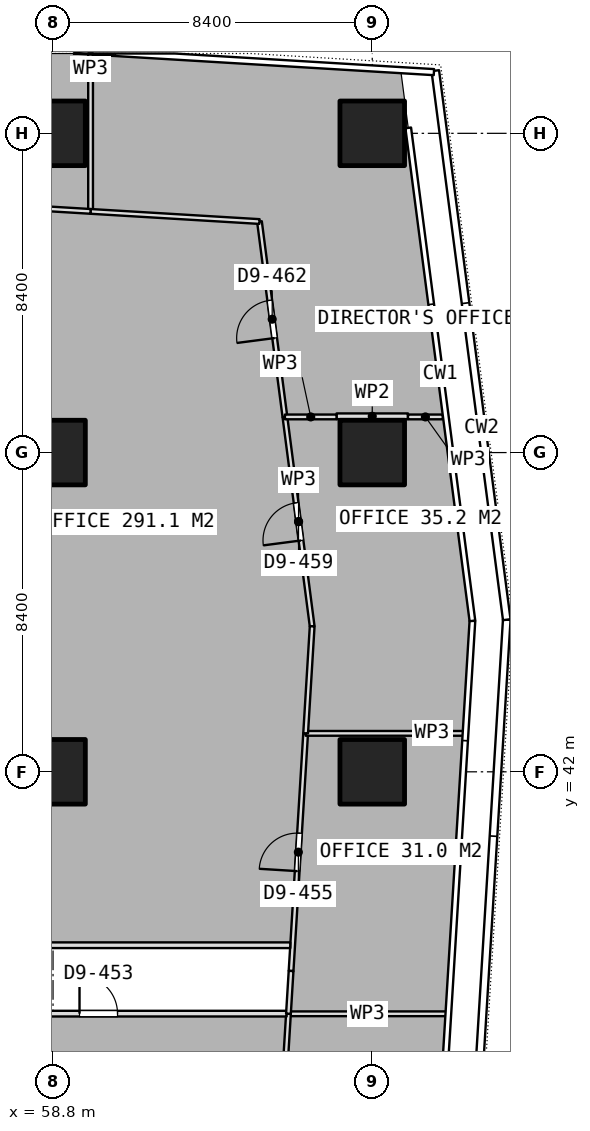
"""IFC4 building model, lengths in metres.
Left out: names, types, materials, properties, quantities, classifications, styles, units other than length and angle.
Written with IfcOpenShell. Run it as: python <this file> out.ifc"""

import sys

from ifc_helpers import new_model, si_unit, direction, frame, frame_2d, origin, origin_2d, place, context, subcontext, project, spatial, rectangle, extrude, element, fill, save


model = new_model("IFC4")
c1 = context("Model", 3, precision=1e-05, world=origin(), true_north=direction((0.0, 1.0)))
c2 = subcontext(c1, "Body", "Model", "MODEL_VIEW")
j1 = project(units=[si_unit("LENGTHUNIT", "METRE"), si_unit("PLANEANGLEUNIT", "RADIAN")], contexts=[c1])
p1 = place(None, origin())
s1 = spatial("IfcSite", under=j1, at=p1, CompositionType="ELEMENT")
p2 = place(p1, origin())
s2 = spatial("IfcBuilding", under=s1, at=p2, CompositionType="ELEMENT")
p3 = place(p2, frame((0.0, 0.0, 121.55)))
s3 = spatial("IfcBuildingStorey", under=s2, at=p3, CompositionType="ELEMENT", Elevation=121.55)
for number, where, z_axis, x_axis in (
    (1, (58.8, 42.0, 0.0), (0.0, 0.0, 1.0), (1.0, 0.0, 0.0)),
    (2, (58.8, 50.4, 0.0), (0.0, 0.0, 1.0), (1.0, 0.0, 0.0)),
    (3, (58.8, 58.8, 0.0), (0.0, 0.0, 1.0), (1.0, 0.0, 0.0)),
    (4, (67.2, 42.0, 0.0), (0.0, 0.0, 1.0), (1.0, 0.0, 0.0)),
    (5, (67.2, 50.4, 0.0), (0.0, 0.0, 1.0), (1.0, 0.0, 0.0)),
    (6, (67.2, 58.8, 0.0), (0.0, 0.0, 1.0), (1.0, 0.0, 0.0)),
):
    element("IfcColumn", number, at=place(p3, frame(where, z_axis=z_axis, x_axis=x_axis)), inside=s3, PredefinedType="COLUMN", context=c2, shape_type="SweptSolid", body=[
        extrude(rectangle(XDim=1.7, YDim=1.7, at=origin_2d()), origin(), (0.0, 0.0, 1.0), 3.75),
    ])
p4 = place(p3, frame((64.995, 35.633, 0.0), z_axis=(0.0, 0.0, 1.0), x_axis=(1.0, 0.0, 0.0)))
e7 = element("IfcWall", 7, at=p4, inside=s3, PredefinedType="PARTITIONING", context=c2, shape_type="SweptSolid", body=[
    extrude(rectangle(XDim=4.157, YDim=0.125, at=frame_2d((2.079, 0.0))), origin(), (0.0, 0.0, 1.0), 3.5),
])
p5 = place(p3, frame((64.527, 28.001, 0.0), z_axis=(0.0, 0.0, 1.0), x_axis=(0.061207439092, 0.998125067013, 0.0)))
e8 = element("IfcWall", 8, at=p5, inside=s3, PredefinedType="PARTITIONING", context=c2, shape_type="SweptSolid", body=[
    extrude(rectangle(XDim=7.646, YDim=0.125, at=frame_2d((3.823, 0.0))), origin(), (0.0, 0.0, 1.0), 3.5),
])
p6 = place(p5, frame((3.323, 0.0, 0.0)))
e9 = element("IfcOpeningElement", 9, at=p6, cuts=e8, PredefinedType="OPENING", context=c2, shape_type="SweptSolid", body=[
    extrude(rectangle(XDim=1.0, YDim=2.1, at=frame_2d((0.5, 1.05))), frame((0.0, 0.073, 0.0), z_axis=(0.0, -1.0, 0.0), x_axis=(1.0, 0.0, 0.0)), (0.0, 0.0, 1.0), 0.145),
])
p7 = place(p3, frame((65.064, 36.76, 0.0), z_axis=(0.0, 0.0, 1.0), x_axis=(0.061155234725, 0.998128266941, 0.0)))
e10 = element("IfcWall", 10, at=p7, inside=s3, PredefinedType="PARTITIONING", context=c2, shape_type="SweptSolid", body=[
    extrude(rectangle(XDim=6.264, YDim=0.125, at=frame_2d((3.132, 0.0))), origin(), (0.0, 0.0, 1.0), 3.5),
])
p8 = place(p7, frame((2.632, 0.0, 0.0)))
e11 = element("IfcOpeningElement", 11, at=p8, cuts=e10, PredefinedType="OPENING", context=c2, shape_type="SweptSolid", body=[
    extrude(rectangle(XDim=1.0, YDim=2.1, at=frame_2d((0.5, 1.05))), frame((0.0, 0.073, 0.0), z_axis=(0.0, -1.0, 0.0), x_axis=(1.0, 0.0, 0.0)), (0.0, 0.0, 1.0), 0.145),
])
p9 = place(p3, frame((65.447, 43.012, 0.0), z_axis=(0.0, 0.0, 1.0), x_axis=(1.0, 0.0, 0.0)))
e12 = element("IfcWall", 12, at=p9, inside=s3, PredefinedType="PARTITIONING", context=c2, shape_type="SweptSolid", body=[
    extrude(rectangle(XDim=4.157, YDim=0.125, at=frame_2d((2.079, 0.0))), origin(), (0.0, 0.0, 1.0), 3.5),
])
p10 = place(p3, frame((64.995, 35.634, 0.0), z_axis=(0.0, 0.0, 1.0), x_axis=(0.061030858212, 0.998135879701, 0.0)))
e13 = element("IfcWall", 13, at=p10, inside=s3, PredefinedType="PARTITIONING", context=c2, shape_type="SweptSolid", body=[
    extrude(rectangle(XDim=1.128, YDim=0.125, at=frame_2d((0.564, 0.0))), origin(), (0.0, 0.0, 1.0), 3.5),
])
p11 = place(p3, frame((64.902, 51.338, 0.0), z_axis=(0.0, 0.0, 1.0), x_axis=(1.0, 0.0, 0.0)))
e14 = element("IfcWall", 14, at=p11, inside=s3, PredefinedType="PARTITIONING", context=c2, shape_type="SweptSolid", body=[
    extrude(rectangle(XDim=1.358, YDim=0.125, at=frame_2d((0.679, 0.0))), origin(), (0.0, 0.0, 1.0), 3.5),
])
p12 = place(p3, frame((68.14, 51.338, 0.0), z_axis=(0.0, 0.0, 1.0), x_axis=(1.0, 0.0, 0.0)))
e15 = element("IfcWall", 15, at=p12, inside=s3, PredefinedType="PARTITIONING", context=c2, shape_type="SweptSolid", body=[
    extrude(rectangle(XDim=0.917, YDim=0.125, at=frame_2d((0.458, 0.0))), origin(), (0.0, 0.0, 1.0), 3.5),
])
p13 = place(p3, frame((65.447, 43.013, 0.0), z_axis=(0.0, 0.0, 1.0), x_axis=(0.060944611384, 0.998141149509, 0.0)))
e16 = element("IfcWall", 16, at=p13, inside=s3, PredefinedType="PARTITIONING", context=c2, shape_type="SweptSolid", body=[
    extrude(rectangle(XDim=2.82, YDim=0.125, at=frame_2d((1.41, 0.0))), origin(), (0.0, 0.0, 1.0), 3.5),
])
p14 = place(p3, frame((65.619, 45.828, 0.0), z_axis=(0.0, 0.0, 1.0), x_axis=(-0.129002942223, 0.991644210843, 0.0)))
e17 = element("IfcWall", 17, at=p14, inside=s3, PredefinedType="PARTITIONING", context=c2, shape_type="SweptSolid", body=[
    extrude(rectangle(XDim=5.556, YDim=0.125, at=frame_2d((2.778, 0.0))), origin(), (0.0, 0.0, 1.0), 3.5),
])
p15 = place(p14, frame((2.278, 0.0, 0.0)))
e18 = element("IfcOpeningElement", 18, at=p15, cuts=e17, PredefinedType="OPENING", context=c2, shape_type="SweptSolid", body=[
    extrude(rectangle(XDim=1.0, YDim=2.1, at=frame_2d((0.5, 1.05))), frame((0.0, 0.073, 0.0), z_axis=(0.0, -1.0, 0.0), x_axis=(1.0, 0.0, 0.0)), (0.0, 0.0, 1.0), 0.145),
])
p16 = place(p3, frame((59.788, 56.746, 0.0), z_axis=(0.0, 0.0, 1.0), x_axis=(0.0, 1.0, 0.0)))
e19 = element("IfcWall", 19, at=p16, inside=s3, PredefinedType="PARTITIONING", context=c2, shape_type="SweptSolid", body=[
    extrude(rectangle(XDim=4.157, YDim=0.125, at=frame_2d((2.079, 0.0))), origin(), (0.0, 0.0, 1.0), 3.5),
])
p17 = place(p3, frame((64.902, 51.339, 0.0), z_axis=(0.0, 0.0, 1.0), x_axis=(-0.129290857756, 0.991606713421, 0.0)))
e20 = element("IfcWall", 20, at=p17, inside=s3, PredefinedType="PARTITIONING", context=c2, shape_type="SweptSolid", body=[
    extrude(rectangle(XDim=5.183, YDim=0.125, at=frame_2d((2.592, 0.0))), origin(), (0.0, 0.0, 1.0), 3.5),
])
p18 = place(p17, frame((2.092, 0.0, 0.0)))
e21 = element("IfcOpeningElement", 21, at=p18, cuts=e20, PredefinedType="OPENING", context=c2, shape_type="SweptSolid", body=[
    extrude(rectangle(XDim=1.0, YDim=2.1, at=frame_2d((0.5, 1.05))), frame((0.0, 0.073, 0.0), z_axis=(0.0, -1.0, 0.0), x_axis=(1.0, 0.0, 0.0)), (0.0, 0.0, 1.0), 0.145),
])
p19 = place(p3, frame((64.232, 56.479, 0.0), z_axis=(0.0, 0.0, 1.0), x_axis=(-0.998198676411, 0.059995019888, 0.0)))
e22 = element("IfcWall", 22, at=p19, inside=s3, PredefinedType="PARTITIONING", context=c2, shape_type="SweptSolid", body=[
    extrude(rectangle(XDim=4.452, YDim=0.125, at=frame_2d((2.226, 0.0))), origin(), (0.0, 0.0, 1.0), 3.5),
])
p20 = place(p3, frame((59.787, 56.746, 0.0), z_axis=(0.0, 0.0, 1.0), x_axis=(-0.99820280668, 0.05992626083, 0.0)))
e23 = element("IfcWall", 23, at=p20, inside=s3, PredefinedType="PARTITIONING", context=c2, shape_type="SweptSolid", body=[
    extrude(rectangle(XDim=8.307, YDim=0.125, at=frame_2d((4.153, 0.0))), origin(), (0.0, 0.0, 1.0), 3.5),
])
p21 = place(p20, frame((3.653, 0.0, 0.0)))
e24 = element("IfcOpeningElement", 24, at=p21, cuts=e23, PredefinedType="OPENING", context=c2, shape_type="SweptSolid", body=[
    extrude(rectangle(XDim=1.0, YDim=2.1, at=frame_2d((0.5, 1.05))), frame((0.0, 0.073, 0.0), z_axis=(0.0, -1.0, 0.0), x_axis=(1.0, 0.0, 0.0)), (0.0, 0.0, 1.0), 0.145),
])
p22 = place(p3, frame((66.26, 51.355, 0.0), z_axis=(0.0, 0.0, 1.0), x_axis=(1.0, 0.0, 0.0)))
e25 = element("IfcWall", 25, at=p22, inside=s3, PredefinedType="PARTITIONING", context=c2, shape_type="SweptSolid", body=[
    extrude(rectangle(XDim=1.88, YDim=0.15, at=frame_2d((0.94, 0.0))), origin(), (0.0, 0.0, 1.0), 3.5),
])
p23 = place(p3, frame((65.043, 37.437, 0.0), z_axis=(0.0, 0.0, 1.0), x_axis=(-1.0, 0.0, 0.0)))
e26 = element("IfcWall", 26, at=p23, inside=s3, PredefinedType="PARTITIONING", context=c2, shape_type="SweptSolid", body=[
    extrude(rectangle(XDim=11.843, YDim=0.15, at=frame_2d((5.921, 0.0))), origin(), (0.0, 0.0, 1.0), 3.5),
])
p24 = place(p3, frame((53.2, 35.637, 0.0), z_axis=(0.0, 0.0, 1.0), x_axis=(1.0, 0.0, 0.0)))
e27 = element("IfcWall", 27, at=p24, inside=s3, PredefinedType="PARTITIONING", context=c2, shape_type="SweptSolid", body=[
    extrude(rectangle(XDim=11.746, YDim=0.15, at=frame_2d((5.873, 0.0))), origin(), (0.0, 0.0, 1.0), 3.5),
])
p25 = place(p24, frame((6.297, 0.0, 0.0)))
e28 = element("IfcOpeningElement", 28, at=p25, cuts=e27, PredefinedType="OPENING", context=c2, shape_type="SweptSolid", body=[
    extrude(rectangle(XDim=1.0, YDim=2.1, at=frame_2d((0.5, 1.05))), frame((0.0, 0.085, 0.0), z_axis=(0.0, -1.0, 0.0), x_axis=(1.0, 0.0, 0.0)), (0.0, 0.0, 1.0), 0.17),
])
p26 = place(p8, origin())
e29 = element("IfcDoor", 29, at=p26, inside=s3, OperationType="SINGLE_SWING_LEFT", PredefinedType="DOOR", context=c2, shape_type="SweptSolid", body=[
    extrude(rectangle(XDim=1.0, YDim=2.1, at=frame_2d((0.5, 1.05))), frame((0.0, 0.025, 0.0), z_axis=(0.0, -1.0, 0.0), x_axis=(1.0, 0.0, 0.0)), (0.0, 0.0, 1.0), 0.05),
])
fill(e11, e29)
p27 = place(p15, origin())
e30 = element("IfcDoor", 30, at=p27, inside=s3, OperationType="SINGLE_SWING_LEFT", PredefinedType="DOOR", context=c2, shape_type="SweptSolid", body=[
    extrude(rectangle(XDim=1.0, YDim=2.1, at=frame_2d((0.5, 1.05))), frame((0.0, 0.025, 0.0), z_axis=(0.0, -1.0, 0.0), x_axis=(1.0, 0.0, 0.0)), (0.0, 0.0, 1.0), 0.05),
])
fill(e18, e30)
p28 = place(p18, origin())
e31 = element("IfcDoor", 31, at=p28, inside=s3, OperationType="SINGLE_SWING_LEFT", PredefinedType="DOOR", context=c2, shape_type="SweptSolid", body=[
    extrude(rectangle(XDim=1.0, YDim=2.1, at=frame_2d((0.5, 1.05))), frame((0.0, 0.025, 0.0), z_axis=(0.0, -1.0, 0.0), x_axis=(1.0, 0.0, 0.0)), (0.0, 0.0, 1.0), 0.05),
])
fill(e21, e31)
p29 = place(p25, origin())
e32 = element("IfcDoor", 32, at=p29, inside=s3, OperationType="SINGLE_SWING_LEFT", PredefinedType="DOOR", context=c2, shape_type="SweptSolid", body=[
    extrude(rectangle(XDim=1.0, YDim=2.1, at=frame_2d((0.5, 1.05))), frame((0.0, 0.025, 0.0), z_axis=(0.0, -1.0, 0.0), x_axis=(1.0, 0.0, 0.0)), (0.0, 0.0, 1.0), 0.05),
])
fill(e28, e32)
save(model, sys.argv[1])
